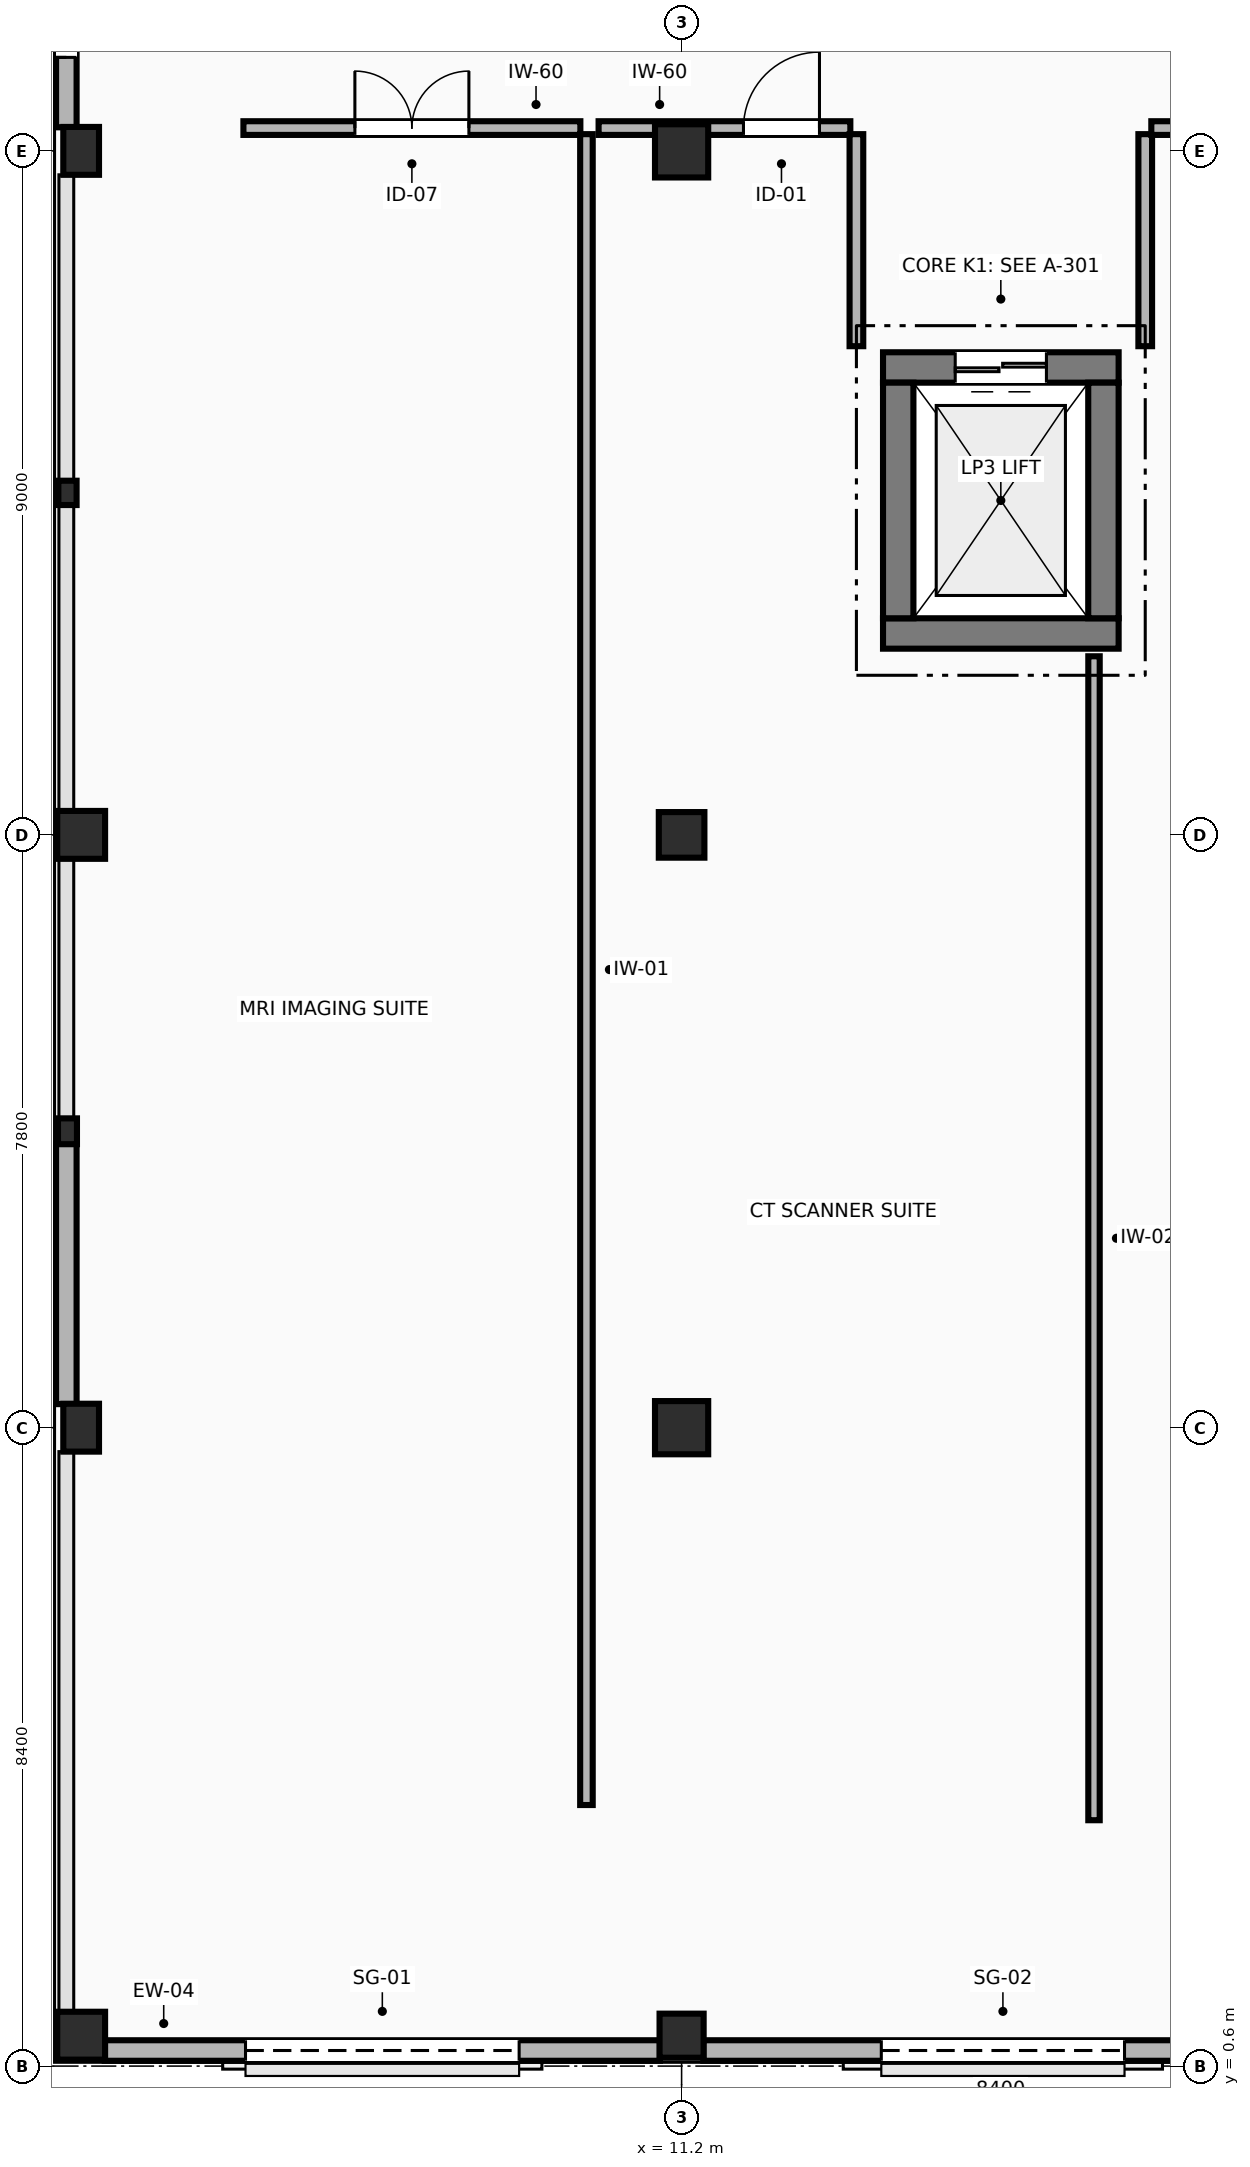
"""IFC4 building model, lengths in metres.
Left out: names, types, materials, properties, quantities, classifications, styles, units other than length and angle.
Written with IfcOpenShell. Run it as: python <this file> out.ifc"""

import sys

from ifc_helpers import new_model, si_unit, direction, frame, frame_2d, origin, origin_2d, place, context, subcontext, project, spatial, rectangle, extrude, element, fill, save


model = new_model("IFC4")
c1 = context("Model", 3, precision=1e-05, world=origin(), true_north=direction((0.0, 1.0)))
c2 = subcontext(c1, "Body", "Model", "MODEL_VIEW")
j1 = project(units=[si_unit("LENGTHUNIT", "METRE"), si_unit("PLANEANGLEUNIT", "RADIAN")], contexts=[c1])
p1 = place(None, origin())
s1 = spatial("IfcSite", under=j1, at=p1, CompositionType="ELEMENT")
p2 = place(p1, origin())
s2 = spatial("IfcBuilding", under=s1, at=p2, CompositionType="ELEMENT")
p3 = place(p2, origin())
s3 = spatial("IfcBuildingStorey", under=s2, at=p3, CompositionType="ELEMENT", Elevation=0.0)
p4 = place(p3, frame((3.3, 1.0, -1.75), z_axis=(0.0, 0.0, 1.0), x_axis=(1.0, 0.0, 0.0)))
e1 = element("IfcColumn", 1, at=p4, inside=s3, PredefinedType="COLUMN", context=c2, shape_type="SweptSolid", body=[
    extrude(rectangle(XDim=0.63, YDim=0.63, at=origin_2d()), origin(), (0.0, 0.0, 1.0), 7.15),
])
p5 = place(p3, frame((3.3, 9.0, -1.75), z_axis=(0.0, 0.0, 1.0), x_axis=(1.0, 0.0, 0.0)))
e2 = element("IfcColumn", 2, at=p5, inside=s3, PredefinedType="COLUMN", context=c2, shape_type="SweptSolid", body=[
    extrude(rectangle(XDim=0.47, YDim=0.63, at=origin_2d()), origin(), (0.0, 0.0, 1.0), 7.15),
])
p6 = place(p3, frame((3.3, 16.8, -1.75), z_axis=(0.0, 0.0, 1.0), x_axis=(1.0, 0.0, 0.0)))
e3 = element("IfcColumn", 3, at=p6, inside=s3, PredefinedType="COLUMN", context=c2, shape_type="SweptSolid", body=[
    extrude(rectangle(XDim=0.63, YDim=0.63, at=origin_2d()), origin(), (0.0, 0.0, 1.0), 7.15),
])
p7 = place(p3, frame((3.3, 25.8, -1.75), z_axis=(0.0, 0.0, 1.0), x_axis=(1.0, 0.0, 0.0)))
e4 = element("IfcColumn", 4, at=p7, inside=s3, PredefinedType="COLUMN", context=c2, shape_type="SweptSolid", body=[
    extrude(rectangle(XDim=0.47, YDim=0.63, at=origin_2d()), origin(), (0.0, 0.0, 1.0), 7.15),
])
p8 = place(p3, frame((11.2, 1.0, -1.75), z_axis=(0.0, 0.0, 1.0), x_axis=(1.0, 0.0, 0.0)))
e5 = element("IfcColumn", 5, at=p8, inside=s3, PredefinedType="COLUMN", context=c2, shape_type="SweptSolid", body=[
    extrude(rectangle(XDim=0.58, YDim=0.58, at=origin_2d()), origin(), (0.0, 0.0, 1.0), 7.15),
])
p9 = place(p3, frame((11.2, 9.0, 0.0), z_axis=(0.0, 0.0, 1.0), x_axis=(1.0, 0.0, 0.0)))
e6 = element("IfcColumn", 6, at=p9, inside=s3, PredefinedType="COLUMN", context=c2, shape_type="SweptSolid", body=[
    extrude(rectangle(XDim=0.7, YDim=0.7, at=origin_2d()), origin(), (0.0, 0.0, 1.0), 5.4),
])
p10 = place(p3, frame((11.2, 16.8, 0.0), z_axis=(0.0, 0.0, 1.0), x_axis=(1.0, 0.0, 0.0)))
e7 = element("IfcColumn", 7, at=p10, inside=s3, PredefinedType="COLUMN", context=c2, shape_type="SweptSolid", body=[
    extrude(rectangle(XDim=0.6, YDim=0.6, at=origin_2d()), origin(), (0.0, 0.0, 1.0), 5.4),
])
p11 = place(p3, frame((11.2, 25.8, 0.0), z_axis=(0.0, 0.0, 1.0), x_axis=(1.0, 0.0, 0.0)))
e8 = element("IfcColumn", 8, at=p11, inside=s3, PredefinedType="COLUMN", context=c2, shape_type="SweptSolid", body=[
    extrude(rectangle(XDim=0.7, YDim=0.7, at=origin_2d()), origin(), (0.0, 0.0, 1.0), 5.4),
])
p12 = place(p3, frame((3.12, 12.9, -1.75), z_axis=(0.0, 0.0, 1.0), x_axis=(1.0, 0.0, 0.0)))
e9 = element("IfcColumn", 9, at=p12, inside=s3, PredefinedType="PILASTER", context=c2, shape_type="SweptSolid", body=[
    extrude(rectangle(XDim=0.25, YDim=0.34, at=origin_2d()), origin(), (0.0, 0.0, 1.0), 7.15),
])
p13 = place(p3, frame((3.12, 21.3, -1.75), z_axis=(0.0, 0.0, 1.0), x_axis=(1.0, 0.0, 0.0)))
e10 = element("IfcColumn", 10, at=p13, inside=s3, PredefinedType="PILASTER", context=c2, shape_type="SweptSolid", body=[
    extrude(rectangle(XDim=0.24, YDim=0.32, at=origin_2d()), origin(), (0.0, 0.0, 1.0), 7.15),
])
p14 = place(p3, frame((3.61, 0.805, 0.0), z_axis=(0.0, 0.0, 1.0), x_axis=(1.0, 0.0, 0.0)))
e11 = element("IfcWall", 11, at=p14, inside=s3, PredefinedType="STANDARD", context=c2, shape_type="SweptSolid", body=[
    extrude(rectangle(XDim=7.305, YDim=0.27, at=frame_2d((3.652, 0.0))), origin(), (0.0, 0.0, 1.0), 4.52),
])
p15 = place(p14, frame((1.853, 0.0, 0.0)))
e12 = element("IfcOpeningElement", 12, at=p15, cuts=e11, PredefinedType="OPENING", context=c2, shape_type="SweptSolid", body=[
    extrude(rectangle(XDim=3.6, YDim=3.0, at=frame_2d((1.8, 1.5))), frame((0.0, 0.145, 0.0), z_axis=(0.0, -1.0, 0.0), x_axis=(1.0, 0.0, 0.0)), (0.0, 0.0, 1.0), 0.29),
])
p16 = place(p3, frame((11.485, 0.805, 0.0), z_axis=(0.0, 0.0, 1.0), x_axis=(1.0, 0.0, 0.0)))
e13 = element("IfcWall", 13, at=p16, inside=s3, PredefinedType="STANDARD", context=c2, shape_type="SweptSolid", body=[
    extrude(rectangle(XDim=7.885, YDim=0.27, at=frame_2d((3.942, 0.0))), origin(), (0.0, 0.0, 1.0), 4.42),
])
p17 = place(p16, frame((2.343, 0.0, 0.0)))
e14 = element("IfcOpeningElement", 14, at=p17, cuts=e13, PredefinedType="OPENING", context=c2, shape_type="SweptSolid", body=[
    extrude(rectangle(XDim=3.2, YDim=2.8, at=frame_2d((1.6, 1.4))), frame((0.0, 0.145, 0.0), z_axis=(0.0, -1.0, 0.0), x_axis=(1.0, 0.0, 0.0)), (0.0, 0.0, 1.0), 0.29),
])
p18 = place(p3, frame((3.105, 34.29, 0.0), z_axis=(0.0, 0.0, 1.0), x_axis=(0.0, -1.0, 0.0)))
e15 = element("IfcWall", 15, at=p18, inside=s3, PredefinedType="STANDARD", context=c2, shape_type="SweptSolid", body=[
    extrude(rectangle(XDim=8.18, YDim=0.27, at=frame_2d((4.09, 0.0))), origin(), (0.0, 0.0, 1.0), 4.535),
])
p19 = place(p18, frame((5.46, 0.0, 0.0)))
e16 = element("IfcOpeningElement", 16, at=p19, cuts=e15, PredefinedType="OPENING", context=c2, shape_type="SweptSolid", body=[
    extrude(rectangle(XDim=1.8, YDim=2.3, at=frame_2d((0.9, 1.15))), frame((0.0, 0.145, 0.0), z_axis=(0.0, -1.0, 0.0), x_axis=(1.0, 0.0, 0.0)), (0.0, 0.0, 1.0), 0.29),
])
p20 = place(p3, frame((3.105, 12.735, 0.0), z_axis=(0.0, 0.0, 1.0), x_axis=(0.0, -1.0, 0.0)))
e17 = element("IfcWall", 17, at=p20, inside=s3, PredefinedType="STANDARD", context=c2, shape_type="SweptSolid", body=[
    extrude(rectangle(XDim=3.425, YDim=0.27, at=frame_2d((1.712, 0.0))), origin(), (0.0, 0.0, 1.0), 4.57),
])
p21 = place(p3, frame((13.85, 19.45, 0.0), z_axis=(0.0, 0.0, 1.0), x_axis=(1.0, 0.0, 0.0)))
e18 = element("IfcWall", 18, at=p21, inside=s3, PredefinedType="SHEAR", context=c2, shape_type="SweptSolid", body=[
    extrude(rectangle(XDim=3.1, YDim=0.4, at=frame_2d((1.55, 0.0))), origin(), (0.0, 0.0, 1.0), 5.4),
])
p22 = place(p3, frame((16.95, 22.95, 0.0), z_axis=(0.0, 0.0, 1.0), x_axis=(-1.0, 0.0, 0.0)))
e19 = element("IfcWall", 19, at=p22, inside=s3, PredefinedType="SHEAR", context=c2, shape_type="SweptSolid", body=[
    extrude(rectangle(XDim=3.1, YDim=0.4, at=frame_2d((1.55, 0.0))), origin(), (0.0, 0.0, 1.0), 5.4),
])
p23 = place(p22, frame((0.95, 0.0, 0.0)))
e20 = element("IfcOpeningElement", 20, at=p23, cuts=e19, PredefinedType="OPENING", context=c2, shape_type="SweptSolid", body=[
    extrude(rectangle(XDim=1.2, YDim=2.2, at=frame_2d((0.6, 1.1))), frame((0.0, 0.21, 0.0), z_axis=(0.0, -1.0, 0.0), x_axis=(1.0, 0.0, 0.0)), (0.0, 0.0, 1.0), 0.42),
])
for number, where, z_axis, x_axis in (
    (21, (14.05, 19.65, 0.0), (0.0, 0.0, 1.0), (0.0, 1.0, 0.0)),
    (22, (16.75, 22.75, 0.0), (0.0, 0.0, 1.0), (0.0, -1.0, 0.0)),
):
    element("IfcWall", number, at=place(p3, frame(where, z_axis=z_axis, x_axis=x_axis)), inside=s3, PredefinedType="SHEAR", context=c2, shape_type="SweptSolid", body=[
        extrude(rectangle(XDim=3.1, YDim=0.4, at=frame_2d((1.55, 0.0))), origin(), (0.0, 0.0, 1.0), 5.4),
    ])
p24 = place(p3, frame((5.435, 26.1, 0.0), z_axis=(0.0, 0.0, 1.0), x_axis=(1.0, 0.0, 0.0)))
e23 = element("IfcWall", 23, at=p24, inside=s3, PredefinedType="PARTITIONING", context=c2, shape_type="SweptSolid", body=[
    extrude(rectangle(XDim=4.433, YDim=0.18, at=frame_2d((2.216, 0.0))), origin(), (0.0, 0.0, 1.0), 4.525),
])
p25 = place(p24, frame((1.467, 0.0, 0.0)))
e24 = element("IfcOpeningElement", 24, at=p25, cuts=e23, PredefinedType="OPENING", context=c2, shape_type="SweptSolid", body=[
    extrude(rectangle(XDim=1.5, YDim=2.3, at=frame_2d((0.75, 1.15))), frame((0.0, 0.1, 0.0), z_axis=(0.0, -1.0, 0.0), x_axis=(1.0, 0.0, 0.0)), (0.0, 0.0, 1.0), 0.2),
])
p26 = place(p3, frame((9.948, 26.02, 0.0), z_axis=(0.0, 0.0, 1.0), x_axis=(0.0, -1.0, 0.0)))
e25 = element("IfcWall", 25, at=p26, inside=s3, PredefinedType="PARTITIONING", context=c2, shape_type="SweptSolid", body=[
    extrude(rectangle(XDim=21.985, YDim=0.165, at=frame_2d((10.993, 0.0))), origin(), (0.0, 0.0, 1.0), 5.05),
])
p27 = place(p3, frame((16.626, 19.15, 0.0), z_axis=(0.0, 0.0, 1.0), x_axis=(0.0, -1.0, 0.0)))
e26 = element("IfcWall", 26, at=p27, inside=s3, PredefinedType="PARTITIONING", context=c2, shape_type="SweptSolid", body=[
    extrude(rectangle(XDim=15.315, YDim=0.15, at=frame_2d((7.657, 0.0))), origin(), (0.0, 0.0, 1.0), 4.793),
])
p28 = place(p3, frame((10.108, 26.1, 0.0), z_axis=(0.0, 0.0, 1.0), x_axis=(1.0, 0.0, 0.0)))
e27 = element("IfcWall", 27, at=p28, inside=s3, PredefinedType="PARTITIONING", context=c2, shape_type="SweptSolid", body=[
    extrude(rectangle(XDim=3.312, YDim=0.18, at=frame_2d((1.656, 0.0))), origin(), (0.0, 0.0, 1.0), 4.385),
])
p29 = place(p28, frame((1.906, 0.0, 0.0)))
e28 = element("IfcOpeningElement", 28, at=p29, cuts=e27, PredefinedType="OPENING", context=c2, shape_type="SweptSolid", body=[
    extrude(rectangle(XDim=1.0, YDim=2.15, at=frame_2d((0.5, 1.075))), frame((0.0, 0.1, 0.0), z_axis=(0.0, -1.0, 0.0), x_axis=(1.0, 0.0, 0.0)), (0.0, 0.0, 1.0), 0.2),
])
for number, where, z_axis, x_axis in (
    (29, (13.5, 26.02, 0.0), (0.0, 0.0, 1.0), (0.0, -1.0, 0.0)),
    (30, (17.3, 23.23, 0.0), (0.0, 0.0, 1.0), (0.0, 1.0, 0.0)),
):
    element("IfcWall", number, at=place(p3, frame(where, z_axis=z_axis, x_axis=x_axis)), inside=s3, PredefinedType="PARTITIONING", context=c2, shape_type="SweptSolid", body=[
        extrude(rectangle(XDim=2.79, YDim=0.18, at=frame_2d((1.395, 0.0))), origin(), (0.0, 0.0, 1.0), 5.05),
    ])
p30 = place(p3, frame((17.38, 26.1, 0.0), z_axis=(0.0, 0.0, 1.0), x_axis=(1.0, 0.0, 0.0)))
e31 = element("IfcWall", 31, at=p30, inside=s3, PredefinedType="PARTITIONING", context=c2, shape_type="SweptSolid", body=[
    extrude(rectangle(XDim=5.844, YDim=0.18, at=frame_2d((2.922, 0.0))), origin(), (0.0, 0.0, 1.0), 4.385),
])
p31 = place(p30, frame((2.922, 0.0, 0.0)))
e32 = element("IfcOpeningElement", 32, at=p31, cuts=e31, PredefinedType="OPENING", context=c2, shape_type="SweptSolid", body=[
    extrude(rectangle(XDim=1.5, YDim=2.3, at=frame_2d((0.75, 1.15))), frame((0.0, 0.1, 0.0), z_axis=(0.0, -1.0, 0.0), x_axis=(1.0, 0.0, 0.0)), (0.0, 0.0, 1.0), 0.2),
])
p32 = place(p15, frame((3.6, 0.0, 0.0), z_axis=(0.0, 0.0, 1.0), x_axis=(-1.0, 0.0, 0.0)))
e33 = element("IfcDoor", 33, at=p32, inside=s3, OperationType="DOUBLE_DOOR_SINGLE_SWING", PredefinedType="GATE", context=c2, shape_type="SweptSolid", body=[
    extrude(rectangle(XDim=3.6, YDim=3.0, at=frame_2d((1.8, 1.5))), frame((0.0, 0.025, 0.0), z_axis=(0.0, -1.0, 0.0), x_axis=(1.0, 0.0, 0.0)), (0.0, 0.0, 1.0), 0.05),
])
fill(e12, e33)
p33 = place(p17, frame((3.2, 0.0, 0.0), z_axis=(0.0, 0.0, 1.0), x_axis=(-1.0, 0.0, 0.0)))
e34 = element("IfcDoor", 34, at=p33, inside=s3, OperationType="DOUBLE_DOOR_SINGLE_SWING", PredefinedType="GATE", context=c2, shape_type="SweptSolid", body=[
    extrude(rectangle(XDim=3.2, YDim=2.8, at=frame_2d((1.6, 1.4))), frame((0.0, 0.025, 0.0), z_axis=(0.0, -1.0, 0.0), x_axis=(1.0, 0.0, 0.0)), (0.0, 0.0, 1.0), 0.05),
])
fill(e14, e34)
p34 = place(p19, frame((1.8, 0.0, 0.0), z_axis=(0.0, 0.0, 1.0), x_axis=(-1.0, 0.0, 0.0)))
e35 = element("IfcDoor", 35, at=p34, inside=s3, OperationType="DOUBLE_DOOR_SINGLE_SWING", PredefinedType="DOOR", context=c2, shape_type="SweptSolid", body=[
    extrude(rectangle(XDim=1.8, YDim=2.3, at=frame_2d((0.9, 1.15))), frame((0.0, 0.025, 0.0), z_axis=(0.0, -1.0, 0.0), x_axis=(1.0, 0.0, 0.0)), (0.0, 0.0, 1.0), 0.05),
])
fill(e16, e35)
p35 = place(p23, origin())
e36 = element("IfcDoor", 36, at=p35, inside=s3, OperationType="DOUBLE_DOOR_SLIDING", PredefinedType="DOOR", context=c2, shape_type="SweptSolid", body=[
    extrude(rectangle(XDim=1.2, YDim=2.2, at=frame_2d((0.6, 1.1))), frame((0.0, 0.025, 0.0), z_axis=(0.0, -1.0, 0.0), x_axis=(1.0, 0.0, 0.0)), (0.0, 0.0, 1.0), 0.05),
])
fill(e20, e36)
p36 = place(p25, origin())
e37 = element("IfcDoor", 37, at=p36, inside=s3, OperationType="DOUBLE_DOOR_SINGLE_SWING", PredefinedType="DOOR", context=c2, shape_type="SweptSolid", body=[
    extrude(rectangle(XDim=1.5, YDim=2.3, at=frame_2d((0.75, 1.15))), frame((0.0, 0.025, 0.0), z_axis=(0.0, -1.0, 0.0), x_axis=(1.0, 0.0, 0.0)), (0.0, 0.0, 1.0), 0.05),
])
fill(e24, e37)
p37 = place(p29, origin())
e38 = element("IfcDoor", 38, at=p37, inside=s3, OperationType="SINGLE_SWING_RIGHT", PredefinedType="DOOR", context=c2, shape_type="SweptSolid", body=[
    extrude(rectangle(XDim=1.0, YDim=2.15, at=frame_2d((0.5, 1.075))), frame((0.0, 0.025, 0.0), z_axis=(0.0, -1.0, 0.0), x_axis=(1.0, 0.0, 0.0)), (0.0, 0.0, 1.0), 0.05),
])
fill(e28, e38)
save(model, sys.argv[1])
